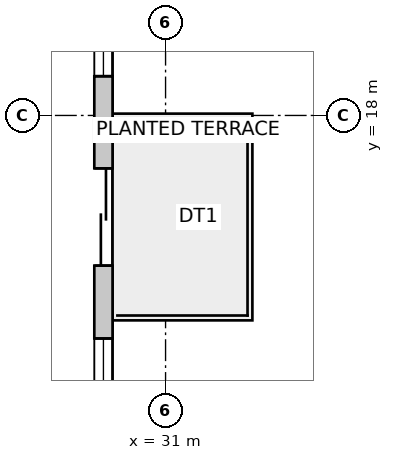
"""IFC4 building model, lengths in metres.
Left out: names, types, materials, properties, quantities, classifications, styles, units other than length and angle.
Written with IfcOpenShell. Run it as: python <this file> out.ifc"""

import sys

from ifc_helpers import new_model, si_unit, direction, frame, frame_2d, origin, place, context, subcontext, project, spatial, rectangle, extrude, source, transform, mapped, element, fill, save


model = new_model("IFC4")
c1 = context("Model", 3, precision=1e-05, world=origin(), true_north=direction((0.0, 1.0)))
c2 = subcontext(c1, "Body", "Model", "MODEL_VIEW")
j1 = project(units=[si_unit("LENGTHUNIT", "METRE"), si_unit("PLANEANGLEUNIT", "RADIAN")], contexts=[c1])
p1 = place(None, origin())
s1 = spatial("IfcSite", under=j1, at=p1, CompositionType="ELEMENT")
p2 = place(p1, origin())
s2 = spatial("IfcBuilding", under=s1, at=p2, CompositionType="ELEMENT")
p3 = place(p2, frame((0.0, 0.0, 55.0)))
s3 = spatial("IfcBuildingStorey", under=s2, at=p3, CompositionType="ELEMENT", Elevation=55.0)
p4 = place(p3, frame((29.978, 5.657, 0.0), z_axis=(0.0, 0.0, 1.0), x_axis=(0.0, 1.0, 0.0)))
e1 = element("IfcWall", 1, at=p4, inside=s3, PredefinedType="SOLIDWALL", context=c2, shape_type="SweptSolid", body=[
    extrude(rectangle(XDim=21.815, YDim=0.3, at=frame_2d((10.907, 0.0))), origin(), (0.0, 0.0, 1.0), 3.75),
])
m1 = source(origin(), c2, "Body", "SweptSolid", [
    extrude(rectangle(XDim=1.6, YDim=2.15, at=frame_2d((0.8, 1.075))), frame((0.0, 0.16, 0.0), z_axis=(0.0, -1.0, 0.0), x_axis=(1.0, 0.0, 0.0)), (0.0, 0.0, 1.0), 0.32),
])
p5 = place(p4, frame((9.873, 0.0, 0.0)))
e2 = element("IfcOpeningElement", 2, at=p5, cuts=e1, PredefinedType="OPENING", context=c2, shape_type="MappedRepresentation", body=[
    mapped(m1, transform((0.0, 0.0, 0.0), scale=1.0)),
])
m2 = source(origin(), c2, "Body", "SweptSolid", [
    extrude(rectangle(XDim=2.4, YDim=2.2, at=frame_2d((1.2, 1.1))), frame((0.0, 0.16, 0.0), z_axis=(0.0, -1.0, 0.0), x_axis=(1.0, 0.0, 0.0)), (0.0, 0.0, 1.0), 0.32),
])
p6 = place(p4, frame((1.438, 0.0, 0.85)))
e3 = element("IfcOpeningElement", 3, at=p6, cuts=e1, PredefinedType="OPENING", context=c2, shape_type="MappedRepresentation", body=[
    mapped(m2, transform((0.0, 0.0, 0.0), scale=1.0)),
])
m3 = source(origin(), c2, "Body", "SweptSolid", [
    extrude(rectangle(XDim=2.8, YDim=2.4, at=frame_2d((1.4, 1.2))), frame((0.0, 0.16, 0.0), z_axis=(0.0, -1.0, 0.0), x_axis=(1.0, 0.0, 0.0)), (0.0, 0.0, 1.0), 0.32),
])
p7 = place(p4, frame((5.875, 0.0, 0.85)))
e4 = element("IfcOpeningElement", 4, at=p7, cuts=e1, PredefinedType="OPENING", context=c2, shape_type="MappedRepresentation", body=[
    mapped(m3, transform((0.0, 0.0, 0.0), scale=1.0)),
])
p8 = place(p4, frame((12.988, 0.0, 0.85)))
e5 = element("IfcOpeningElement", 5, at=p8, cuts=e1, PredefinedType="OPENING", context=c2, shape_type="MappedRepresentation", body=[
    mapped(m2, transform((0.0, 0.0, 0.0), scale=1.0)),
])
p9 = place(p4, frame((17.659, 0.0, 0.85)))
e6 = element("IfcOpeningElement", 6, at=p9, cuts=e1, PredefinedType="OPENING", context=c2, shape_type="MappedRepresentation", body=[
    mapped(m3, transform((0.0, 0.0, 0.0), scale=1.0)),
])
m4 = source(origin(), c2, "Body", "SweptSolid", [
    extrude(rectangle(XDim=1.6, YDim=2.15, at=frame_2d((0.8, 1.075))), frame((0.0, 0.025, 0.0), z_axis=(0.0, -1.0, 0.0), x_axis=(1.0, 0.0, 0.0)), (0.0, 0.0, 1.0), 0.05),
])
p10 = place(p5, origin())
e7 = element("IfcDoor", 7, at=p10, inside=s3, OperationType="DOUBLE_DOOR_SLIDING", PredefinedType="DOOR", context=c2, shape_type="MappedRepresentation", body=[
    mapped(m4, transform((0.0, 0.0, 0.0), scale=1.0)),
])
fill(e2, e7)
m5 = source(origin(), c2, "Body", "SweptSolid", [
    extrude(rectangle(XDim=2.8, YDim=2.4, at=frame_2d((1.4, 1.2))), frame((0.0, -0.015, 0.0), z_axis=(0.0, -1.0, 0.0), x_axis=(1.0, 0.0, 0.0)), (0.0, 0.0, 1.0), 0.06),
])
p11 = place(p7, origin())
e8 = element("IfcWindow", 8, at=p11, inside=s3, PartitioningType="SINGLE_PANEL", PredefinedType="WINDOW", context=c2, shape_type="MappedRepresentation", body=[
    mapped(m5, transform((0.0, 0.0, 0.0), scale=1.0)),
])
fill(e4, e8)
m6 = source(origin(), c2, "Body", "SweptSolid", [
    extrude(rectangle(XDim=2.4, YDim=2.2, at=frame_2d((1.2, 1.1))), frame((0.0, -0.015, 0.0), z_axis=(0.0, -1.0, 0.0), x_axis=(1.0, 0.0, 0.0)), (0.0, 0.0, 1.0), 0.06),
])
p12 = place(p8, origin())
e9 = element("IfcWindow", 9, at=p12, inside=s3, PartitioningType="SINGLE_PANEL", PredefinedType="WINDOW", context=c2, shape_type="MappedRepresentation", body=[
    mapped(m6, transform((0.0, 0.0, 0.0), scale=1.0)),
])
fill(e5, e9)
save(model, sys.argv[1])
